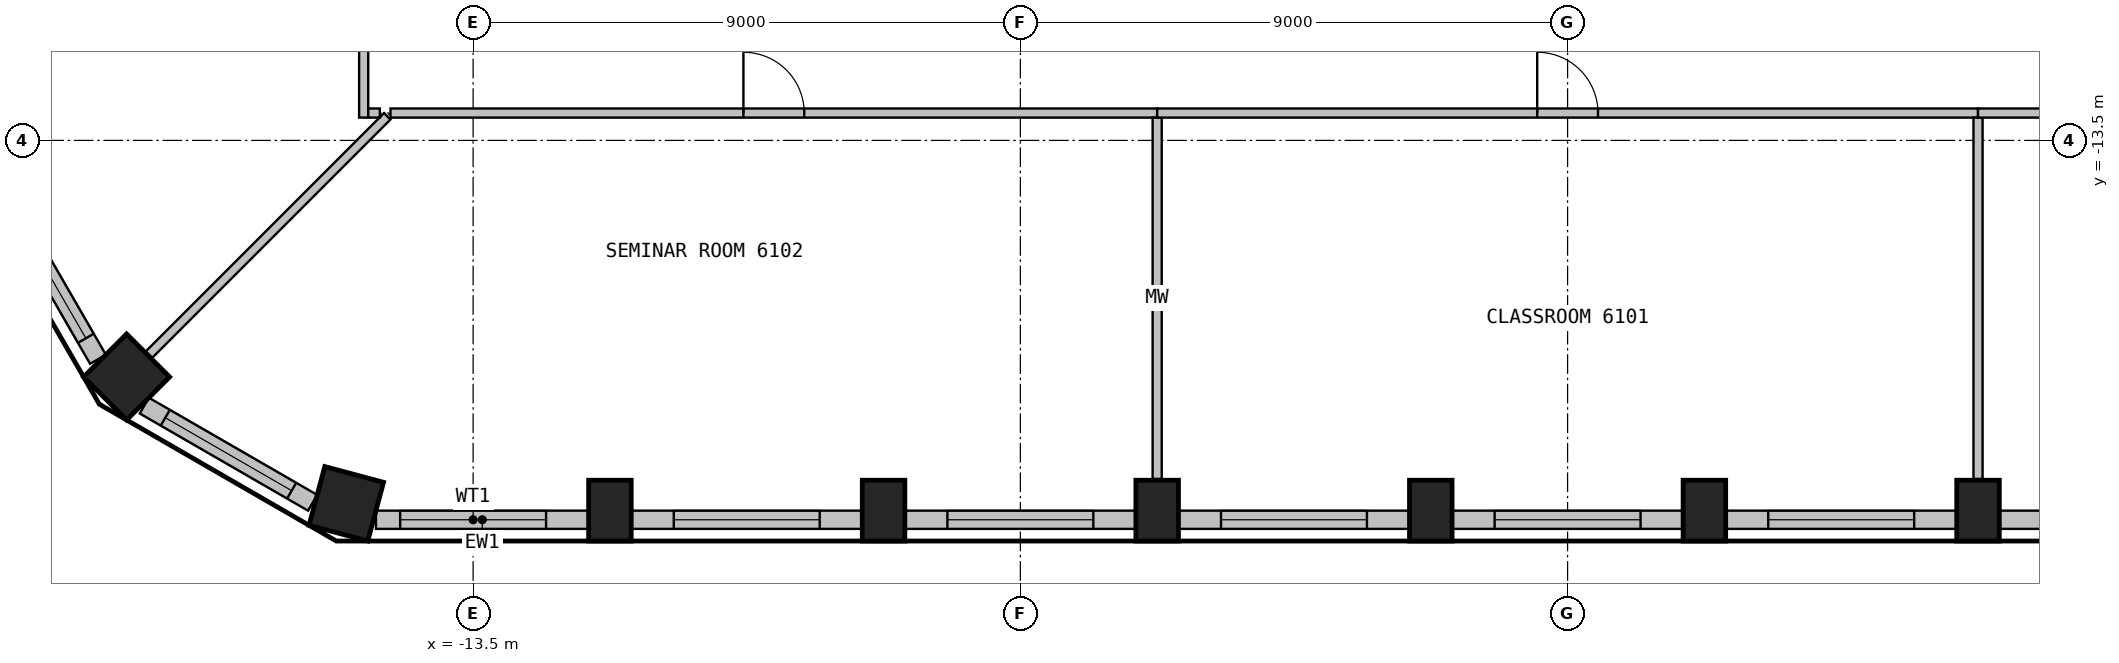
"""IFC4 building model, lengths in metres.
Left out: names, types, materials, properties, quantities, classifications, styles, units other than length and angle.
Written with IfcOpenShell. Run it as: python <this file> out.ifc"""

import sys

from ifc_helpers import new_model, si_unit, direction, frame, frame_2d, origin, origin_2d, place, context, subcontext, project, spatial, rectangle, extrude, element, fill, save


model = new_model("IFC4")
c1 = context("Model", 3, precision=1e-05, world=origin(), true_north=direction((0.0, 1.0)))
c2 = subcontext(c1, "Body", "Model", "MODEL_VIEW")
j1 = project(units=[si_unit("LENGTHUNIT", "METRE"), si_unit("PLANEANGLEUNIT", "RADIAN")], contexts=[c1])
p1 = place(None, origin())
s1 = spatial("IfcSite", under=j1, at=p1, CompositionType="ELEMENT")
p2 = place(p1, origin())
s2 = spatial("IfcBuilding", under=s1, at=p2, CompositionType="ELEMENT")
p3 = place(p2, frame((0.0, 0.0, 246.9)))
s3 = spatial("IfcBuildingStorey", under=s2, at=p3, CompositionType="ELEMENT", Elevation=246.9)
p4 = place(p3, frame((-15.586, -19.476, 0.0), z_axis=(0.0, 0.0, 1.0), x_axis=(0.965925826289, -0.258819045103, 0.0)))
e1 = element("IfcColumn", 1, at=p4, inside=s3, PredefinedType="COLUMN", context=c2, shape_type="SweptSolid", body=[
    extrude(rectangle(XDim=1.0, YDim=1.0, at=origin_2d()), origin(), (0.0, 0.0, 1.0), 3.575),
])
for number, where, z_axis, x_axis in (
    (2, (-11.25, -19.588, 0.0), (0.0, 0.0, 1.0), (1.0, 0.0, 0.0)),
    (3, (-6.75, -19.588, 0.0), (0.0, 0.0, 1.0), (1.0, 0.0, 0.0)),
    (4, (-2.25, -19.588, 0.0), (0.0, 0.0, 1.0), (1.0, 0.0, 0.0)),
    (5, (2.25, -19.588, 0.0), (0.0, 0.0, 1.0), (1.0, 0.0, 0.0)),
    (6, (6.75, -19.588, 0.0), (0.0, 0.0, 1.0), (1.0, 0.0, 0.0)),
    (7, (11.25, -19.588, 0.0), (0.0, 0.0, 1.0), (1.0, 0.0, 0.0)),
):
    element("IfcColumn", number, at=place(p3, frame(where, z_axis=z_axis, x_axis=x_axis)), inside=s3, PredefinedType="COLUMN", context=c2, shape_type="SweptSolid", body=[
        extrude(rectangle(XDim=0.7, YDim=1.0, at=origin_2d()), origin(), (0.0, 0.0, 1.0), 3.575),
    ])
p5 = place(p3, frame((-19.199, -17.39, 0.0), z_axis=(0.0, 0.0, 1.0), x_axis=(0.707106781187, -0.707106781187, 0.0)))
e8 = element("IfcColumn", 8, at=p5, inside=s3, PredefinedType="COLUMN", context=c2, shape_type="SweptSolid", body=[
    extrude(rectangle(XDim=1.0, YDim=1.0, at=origin_2d()), origin(), (0.0, 0.0, 1.0), 3.575),
])
p6 = place(p3, frame((-15.098, -19.739, 0.0), z_axis=(0.0, 0.0, 1.0), x_axis=(1.0, 0.0, 0.0)))
e9 = element("IfcWall", 9, at=p6, inside=s3, PredefinedType="SOLIDWALL", context=c2, shape_type="SweptSolid", body=[
    extrude(rectangle(XDim=3.498, YDim=0.3, at=frame_2d((1.749, 0.0))), origin(), (0.0, 0.0, 1.0), 3.575),
])
p7 = place(p6, frame((0.398, 0.0, 0.9)))
e10 = element("IfcOpeningElement", 10, at=p7, cuts=e9, PredefinedType="OPENING", context=c2, shape_type="SweptSolid", body=[
    extrude(rectangle(XDim=2.4, YDim=2.1, at=frame_2d((1.2, 1.05))), frame((0.0, 0.16, 0.0), z_axis=(0.0, -1.0, 0.0), x_axis=(1.0, 0.0, 0.0)), (0.0, 0.0, 1.0), 0.32),
])
p8 = place(p3, frame((-10.899, -19.739, 0.0), z_axis=(0.0, 0.0, 1.0), x_axis=(1.0, 0.0, 0.0)))
e11 = element("IfcWall", 11, at=p8, inside=s3, PredefinedType="SOLIDWALL", context=c2, shape_type="SweptSolid", body=[
    extrude(rectangle(XDim=3.799, YDim=0.3, at=frame_2d((1.899, 0.0))), origin(), (0.0, 0.0, 1.0), 3.575),
])
p9 = place(p8, frame((0.699, 0.0, 0.9)))
e12 = element("IfcOpeningElement", 12, at=p9, cuts=e11, PredefinedType="OPENING", context=c2, shape_type="SweptSolid", body=[
    extrude(rectangle(XDim=2.4, YDim=2.1, at=frame_2d((1.2, 1.05))), frame((0.0, 0.16, 0.0), z_axis=(0.0, -1.0, 0.0), x_axis=(1.0, 0.0, 0.0)), (0.0, 0.0, 1.0), 0.32),
])
p10 = place(p3, frame((-6.399, -19.739, 0.0), z_axis=(0.0, 0.0, 1.0), x_axis=(1.0, 0.0, 0.0)))
e13 = element("IfcWall", 13, at=p10, inside=s3, PredefinedType="SOLIDWALL", context=c2, shape_type="SweptSolid", body=[
    extrude(rectangle(XDim=3.799, YDim=0.3, at=frame_2d((1.899, 0.0))), origin(), (0.0, 0.0, 1.0), 3.575),
])
p11 = place(p10, frame((0.699, 0.0, 0.9)))
e14 = element("IfcOpeningElement", 14, at=p11, cuts=e13, PredefinedType="OPENING", context=c2, shape_type="SweptSolid", body=[
    extrude(rectangle(XDim=2.4, YDim=2.1, at=frame_2d((1.2, 1.05))), frame((0.0, 0.16, 0.0), z_axis=(0.0, -1.0, 0.0), x_axis=(1.0, 0.0, 0.0)), (0.0, 0.0, 1.0), 0.32),
])
p12 = place(p3, frame((-1.899, -19.739, 0.0), z_axis=(0.0, 0.0, 1.0), x_axis=(1.0, 0.0, 0.0)))
e15 = element("IfcWall", 15, at=p12, inside=s3, PredefinedType="SOLIDWALL", context=c2, shape_type="SweptSolid", body=[
    extrude(rectangle(XDim=3.799, YDim=0.3, at=frame_2d((1.899, 0.0))), origin(), (0.0, 0.0, 1.0), 3.575),
])
p13 = place(p12, frame((0.699, 0.0, 0.9)))
e16 = element("IfcOpeningElement", 16, at=p13, cuts=e15, PredefinedType="OPENING", context=c2, shape_type="SweptSolid", body=[
    extrude(rectangle(XDim=2.4, YDim=2.1, at=frame_2d((1.2, 1.05))), frame((0.0, 0.16, 0.0), z_axis=(0.0, -1.0, 0.0), x_axis=(1.0, 0.0, 0.0)), (0.0, 0.0, 1.0), 0.32),
])
p14 = place(p3, frame((2.601, -19.739, 0.0), z_axis=(0.0, 0.0, 1.0), x_axis=(1.0, 0.0, 0.0)))
e17 = element("IfcWall", 17, at=p14, inside=s3, PredefinedType="SOLIDWALL", context=c2, shape_type="SweptSolid", body=[
    extrude(rectangle(XDim=3.799, YDim=0.3, at=frame_2d((1.899, 0.0))), origin(), (0.0, 0.0, 1.0), 3.575),
])
p15 = place(p14, frame((0.699, 0.0, 0.9)))
e18 = element("IfcOpeningElement", 18, at=p15, cuts=e17, PredefinedType="OPENING", context=c2, shape_type="SweptSolid", body=[
    extrude(rectangle(XDim=2.4, YDim=2.1, at=frame_2d((1.2, 1.05))), frame((0.0, 0.16, 0.0), z_axis=(0.0, -1.0, 0.0), x_axis=(1.0, 0.0, 0.0)), (0.0, 0.0, 1.0), 0.32),
])
p16 = place(p3, frame((7.101, -19.739, 0.0), z_axis=(0.0, 0.0, 1.0), x_axis=(1.0, 0.0, 0.0)))
e19 = element("IfcWall", 19, at=p16, inside=s3, PredefinedType="SOLIDWALL", context=c2, shape_type="SweptSolid", body=[
    extrude(rectangle(XDim=3.799, YDim=0.3, at=frame_2d((1.899, 0.0))), origin(), (0.0, 0.0, 1.0), 3.575),
])
p17 = place(p16, frame((0.699, 0.0, 0.9)))
e20 = element("IfcOpeningElement", 20, at=p17, cuts=e19, PredefinedType="OPENING", context=c2, shape_type="SweptSolid", body=[
    extrude(rectangle(XDim=2.4, YDim=2.1, at=frame_2d((1.2, 1.05))), frame((0.0, 0.16, 0.0), z_axis=(0.0, -1.0, 0.0), x_axis=(1.0, 0.0, 0.0)), (0.0, 0.0, 1.0), 0.32),
])
p18 = place(p3, frame((11.601, -19.739, 0.0), z_axis=(0.0, 0.0, 1.0), x_axis=(1.0, 0.0, 0.0)))
e21 = element("IfcWall", 21, at=p18, inside=s3, PredefinedType="SOLIDWALL", context=c2, shape_type="SweptSolid", body=[
    extrude(rectangle(XDim=3.498, YDim=0.3, at=frame_2d((1.749, 0.0))), origin(), (0.0, 0.0, 1.0), 3.575),
])
p19 = place(p18, frame((0.699, 0.0, 0.9)))
e22 = element("IfcOpeningElement", 22, at=p19, cuts=e21, PredefinedType="OPENING", context=c2, shape_type="SweptSolid", body=[
    extrude(rectangle(XDim=2.4, YDim=2.1, at=frame_2d((1.2, 1.05))), frame((0.0, 0.16, 0.0), z_axis=(0.0, -1.0, 0.0), x_axis=(1.0, 0.0, 0.0)), (0.0, 0.0, 1.0), 0.32),
])
p20 = place(p3, frame((-21.419, -14.07, 0.0), z_axis=(0.0, 0.0, 1.0), x_axis=(0.499960102815, -0.866048437209, 0.0)))
e23 = element("IfcWall", 23, at=p20, inside=s3, PredefinedType="SOLIDWALL", context=c2, shape_type="SweptSolid", body=[
    extrude(rectangle(XDim=3.498, YDim=0.3, at=frame_2d((1.749, 0.0))), origin(), (0.0, 0.0, 1.0), 3.575),
])
p21 = place(p20, frame((0.699, 0.0, 0.9)))
e24 = element("IfcOpeningElement", 24, at=p21, cuts=e23, PredefinedType="OPENING", context=c2, shape_type="SweptSolid", body=[
    extrude(rectangle(XDim=2.4, YDim=2.1, at=frame_2d((1.2, 1.05))), frame((0.0, 0.16, 0.0), z_axis=(0.0, -1.0, 0.0), x_axis=(1.0, 0.0, 0.0)), (0.0, 0.0, 1.0), 0.32),
])
p22 = place(p3, frame((-18.908, -17.861, 0.0), z_axis=(0.0, 0.0, 1.0), x_axis=(0.866025316205, -0.500000151692, 0.0)))
e25 = element("IfcWall", 25, at=p22, inside=s3, PredefinedType="SOLIDWALL", context=c2, shape_type="SweptSolid", body=[
    extrude(rectangle(XDim=3.196, YDim=0.3, at=frame_2d((1.598, 0.0))), origin(), (0.0, 0.0, 1.0), 3.575),
])
p23 = place(p22, frame((0.398, 0.0, 0.9)))
e26 = element("IfcOpeningElement", 26, at=p23, cuts=e25, PredefinedType="OPENING", context=c2, shape_type="SweptSolid", body=[
    extrude(rectangle(XDim=2.4, YDim=2.1, at=frame_2d((1.2, 1.05))), frame((0.0, 0.16, 0.0), z_axis=(0.0, -1.0, 0.0), x_axis=(1.0, 0.0, 0.0)), (0.0, 0.0, 1.0), 0.32),
])
p24 = place(p3, frame((-14.912, -13.103, 0.0), z_axis=(0.0, 0.0, 1.0), x_axis=(-0.707018679171, -0.707194872226, 0.0)))
e27 = element("IfcWall", 27, at=p24, inside=s3, PredefinedType="PARTITIONING", context=c2, shape_type="SweptSolid", body=[
    extrude(rectangle(XDim=5.542, YDim=0.15, at=frame_2d((2.771, 0.0))), origin(), (0.0, 0.0, 1.0), 3.575),
])
p25 = place(p3, frame((-15.3, -1.326, 0.0), z_axis=(0.0, 0.0, 1.0), x_axis=(0.0, -1.0, 0.0)))
e28 = element("IfcWall", 28, at=p25, inside=s3, PredefinedType="PARTITIONING", context=c2, shape_type="SweptSolid", body=[
    extrude(rectangle(XDim=11.799, YDim=0.15, at=frame_2d((5.899, 0.0))), origin(), (0.0, 0.0, 1.0), 3.575),
])
p26 = place(p25, frame((5.399, 0.0, 0.0)))
e29 = element("IfcOpeningElement", 29, at=p26, cuts=e28, PredefinedType="OPENING", context=c2, shape_type="SweptSolid", body=[
    extrude(rectangle(XDim=1.0, YDim=2.1, at=frame_2d((0.5, 1.05))), frame((0.0, 0.085, 0.0), z_axis=(0.0, -1.0, 0.0), x_axis=(1.0, 0.0, 0.0)), (0.0, 0.0, 1.0), 0.17),
])
p27 = place(p3, frame((-15.225, -13.05, 0.0), z_axis=(0.0, 0.0, 1.0), x_axis=(1.0, 0.0, 0.0)))
e30 = element("IfcWall", 30, at=p27, inside=s3, PredefinedType="PARTITIONING", context=c2, shape_type="SweptSolid", body=[
    extrude(rectangle(XDim=0.191, YDim=0.15, at=frame_2d((0.096, 0.0))), origin(), (0.0, 0.0, 1.0), 3.575),
])
p28 = place(p3, frame((-14.859, -13.05, 0.0), z_axis=(0.0, 0.0, 1.0), x_axis=(1.0, 0.0, 0.0)))
e31 = element("IfcWall", 31, at=p28, inside=s3, PredefinedType="PARTITIONING", context=c2, shape_type="SweptSolid", body=[
    extrude(rectangle(XDim=12.609, YDim=0.15, at=frame_2d((6.304, 0.0))), origin(), (0.0, 0.0, 1.0), 3.575),
])
p29 = place(p28, frame((5.804, 0.0, 0.0)))
e32 = element("IfcOpeningElement", 32, at=p29, cuts=e31, PredefinedType="OPENING", context=c2, shape_type="SweptSolid", body=[
    extrude(rectangle(XDim=1.0, YDim=2.1, at=frame_2d((0.5, 1.05))), frame((0.0, 0.085, 0.0), z_axis=(0.0, -1.0, 0.0), x_axis=(1.0, 0.0, 0.0)), (0.0, 0.0, 1.0), 0.17),
])
p30 = place(p3, frame((-2.25, -13.125, 0.0), z_axis=(0.0, 0.0, 1.0), x_axis=(0.0, -1.0, 0.0)))
e33 = element("IfcWall", 33, at=p30, inside=s3, PredefinedType="MOVABLE", context=c2, shape_type="SweptSolid", body=[
    extrude(rectangle(XDim=5.944, YDim=0.15, at=frame_2d((2.972, 0.0))), origin(), (0.0, 0.0, 1.0), 3.575),
])
p31 = place(p3, frame((-2.25, -13.05, 0.0), z_axis=(0.0, 0.0, 1.0), x_axis=(1.0, 0.0, 0.0)))
e34 = element("IfcWall", 34, at=p31, inside=s3, PredefinedType="PARTITIONING", context=c2, shape_type="SweptSolid", body=[
    extrude(rectangle(XDim=13.5, YDim=0.15, at=frame_2d((6.75, 0.0))), origin(), (0.0, 0.0, 1.0), 3.575),
])
p32 = place(p31, frame((6.25, 0.0, 0.0)))
e35 = element("IfcOpeningElement", 35, at=p32, cuts=e34, PredefinedType="OPENING", context=c2, shape_type="SweptSolid", body=[
    extrude(rectangle(XDim=1.0, YDim=2.1, at=frame_2d((0.5, 1.05))), frame((0.0, 0.085, 0.0), z_axis=(0.0, -1.0, 0.0), x_axis=(1.0, 0.0, 0.0)), (0.0, 0.0, 1.0), 0.17),
])
p33 = place(p3, frame((11.25, -13.125, 0.0), z_axis=(0.0, 0.0, 1.0), x_axis=(0.0, -1.0, 0.0)))
e36 = element("IfcWall", 36, at=p33, inside=s3, PredefinedType="PARTITIONING", context=c2, shape_type="SweptSolid", body=[
    extrude(rectangle(XDim=5.944, YDim=0.15, at=frame_2d((2.972, 0.0))), origin(), (0.0, 0.0, 1.0), 3.575),
])
p34 = place(p3, frame((11.25, -13.05, 0.0), z_axis=(0.0, 0.0, 1.0), x_axis=(1.0, 0.0, 0.0)))
e37 = element("IfcWall", 37, at=p34, inside=s3, PredefinedType="PARTITIONING", context=c2, shape_type="SweptSolid", body=[
    extrude(rectangle(XDim=4.125, YDim=0.15, at=frame_2d((2.062, 0.0))), origin(), (0.0, 0.0, 1.0), 3.575),
])
p35 = place(p34, frame((1.562, 0.0, 0.0)))
e38 = element("IfcOpeningElement", 38, at=p35, cuts=e37, PredefinedType="OPENING", context=c2, shape_type="SweptSolid", body=[
    extrude(rectangle(XDim=1.0, YDim=2.1, at=frame_2d((0.5, 1.05))), frame((0.0, 0.085, 0.0), z_axis=(0.0, -1.0, 0.0), x_axis=(1.0, 0.0, 0.0)), (0.0, 0.0, 1.0), 0.17),
])
p36 = place(p7, origin())
e39 = element("IfcWindow", 39, at=p36, inside=s3, PartitioningType="SINGLE_PANEL", PredefinedType="WINDOW", context=c2, shape_type="SweptSolid", body=[
    extrude(rectangle(XDim=2.4, YDim=2.1, at=frame_2d((1.2, 1.05))), frame((0.0, 0.03, 0.0), z_axis=(0.0, -1.0, 0.0), x_axis=(1.0, 0.0, 0.0)), (0.0, 0.0, 1.0), 0.06),
])
fill(e10, e39)
p37 = place(p9, origin())
e40 = element("IfcWindow", 40, at=p37, inside=s3, PartitioningType="SINGLE_PANEL", PredefinedType="WINDOW", context=c2, shape_type="SweptSolid", body=[
    extrude(rectangle(XDim=2.4, YDim=2.1, at=frame_2d((1.2, 1.05))), frame((0.0, 0.03, 0.0), z_axis=(0.0, -1.0, 0.0), x_axis=(1.0, 0.0, 0.0)), (0.0, 0.0, 1.0), 0.06),
])
fill(e12, e40)
p38 = place(p11, origin())
e41 = element("IfcWindow", 41, at=p38, inside=s3, PartitioningType="SINGLE_PANEL", PredefinedType="WINDOW", context=c2, shape_type="SweptSolid", body=[
    extrude(rectangle(XDim=2.4, YDim=2.1, at=frame_2d((1.2, 1.05))), frame((0.0, 0.03, 0.0), z_axis=(0.0, -1.0, 0.0), x_axis=(1.0, 0.0, 0.0)), (0.0, 0.0, 1.0), 0.06),
])
fill(e14, e41)
p39 = place(p13, origin())
e42 = element("IfcWindow", 42, at=p39, inside=s3, PartitioningType="SINGLE_PANEL", PredefinedType="WINDOW", context=c2, shape_type="SweptSolid", body=[
    extrude(rectangle(XDim=2.4, YDim=2.1, at=frame_2d((1.2, 1.05))), frame((0.0, 0.03, 0.0), z_axis=(0.0, -1.0, 0.0), x_axis=(1.0, 0.0, 0.0)), (0.0, 0.0, 1.0), 0.06),
])
fill(e16, e42)
p40 = place(p15, origin())
e43 = element("IfcWindow", 43, at=p40, inside=s3, PartitioningType="SINGLE_PANEL", PredefinedType="WINDOW", context=c2, shape_type="SweptSolid", body=[
    extrude(rectangle(XDim=2.4, YDim=2.1, at=frame_2d((1.2, 1.05))), frame((0.0, 0.03, 0.0), z_axis=(0.0, -1.0, 0.0), x_axis=(1.0, 0.0, 0.0)), (0.0, 0.0, 1.0), 0.06),
])
fill(e18, e43)
p41 = place(p17, origin())
e44 = element("IfcWindow", 44, at=p41, inside=s3, PartitioningType="SINGLE_PANEL", PredefinedType="WINDOW", context=c2, shape_type="SweptSolid", body=[
    extrude(rectangle(XDim=2.4, YDim=2.1, at=frame_2d((1.2, 1.05))), frame((0.0, 0.03, 0.0), z_axis=(0.0, -1.0, 0.0), x_axis=(1.0, 0.0, 0.0)), (0.0, 0.0, 1.0), 0.06),
])
fill(e20, e44)
p42 = place(p21, origin())
e45 = element("IfcWindow", 45, at=p42, inside=s3, PartitioningType="SINGLE_PANEL", PredefinedType="WINDOW", context=c2, shape_type="SweptSolid", body=[
    extrude(rectangle(XDim=2.4, YDim=2.1, at=frame_2d((1.2, 1.05))), frame((0.0, 0.03, 0.0), z_axis=(0.0, -1.0, 0.0), x_axis=(1.0, 0.0, 0.0)), (0.0, 0.0, 1.0), 0.06),
])
fill(e24, e45)
p43 = place(p23, origin())
e46 = element("IfcWindow", 46, at=p43, inside=s3, PartitioningType="SINGLE_PANEL", PredefinedType="WINDOW", context=c2, shape_type="SweptSolid", body=[
    extrude(rectangle(XDim=2.4, YDim=2.1, at=frame_2d((1.2, 1.05))), frame((0.0, 0.03, 0.0), z_axis=(0.0, -1.0, 0.0), x_axis=(1.0, 0.0, 0.0)), (0.0, 0.0, 1.0), 0.06),
])
fill(e26, e46)
p44 = place(p29, origin())
e47 = element("IfcDoor", 47, at=p44, inside=s3, OperationType="SINGLE_SWING_RIGHT", PredefinedType="DOOR", context=c2, shape_type="SweptSolid", body=[
    extrude(rectangle(XDim=1.0, YDim=2.1, at=frame_2d((0.5, 1.05))), frame((0.0, 0.025, 0.0), z_axis=(0.0, -1.0, 0.0), x_axis=(1.0, 0.0, 0.0)), (0.0, 0.0, 1.0), 0.05),
])
fill(e32, e47)
p45 = place(p32, origin())
e48 = element("IfcDoor", 48, at=p45, inside=s3, OperationType="SINGLE_SWING_RIGHT", PredefinedType="DOOR", context=c2, shape_type="SweptSolid", body=[
    extrude(rectangle(XDim=1.0, YDim=2.1, at=frame_2d((0.5, 1.05))), frame((0.0, 0.025, 0.0), z_axis=(0.0, -1.0, 0.0), x_axis=(1.0, 0.0, 0.0)), (0.0, 0.0, 1.0), 0.05),
])
fill(e35, e48)
save(model, sys.argv[1])
